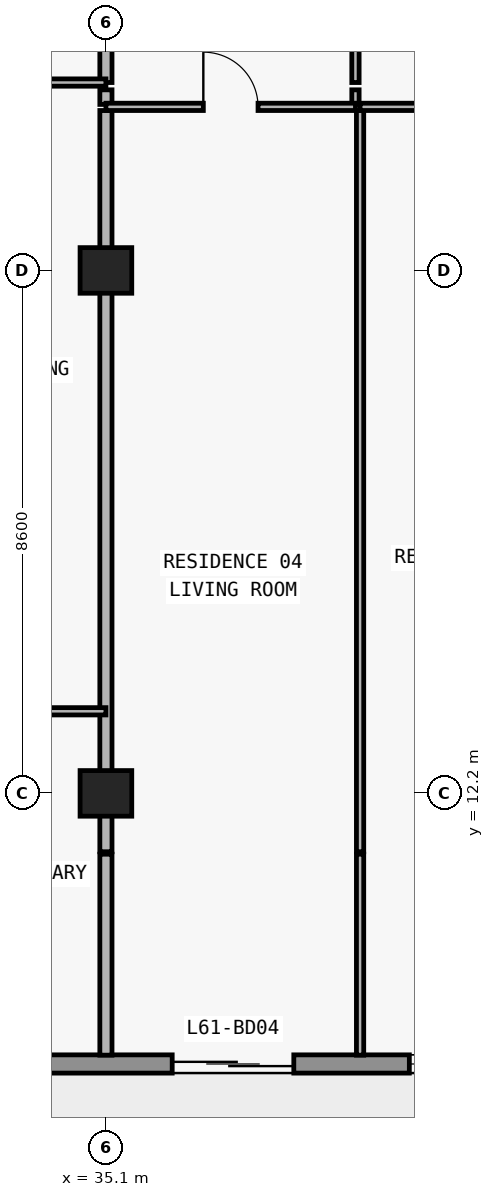
"""IFC4 building model, lengths in metres.
Left out: names, types, materials, properties, quantities, classifications, styles, units other than length and angle.
Written with IfcOpenShell. Run it as: python <this file> out.ifc"""

import sys

from ifc_helpers import new_model, si_unit, direction, frame, frame_2d, origin, origin_2d, place, context, subcontext, project, spatial, rectangle, extrude, element, fill, save


model = new_model("IFC4")
c1 = context("Model", 3, precision=1e-05, world=origin(), true_north=direction((0.0, 1.0)))
c2 = subcontext(c1, "Body", "Model", "MODEL_VIEW")
j1 = project(units=[si_unit("LENGTHUNIT", "METRE"), si_unit("PLANEANGLEUNIT", "RADIAN")], contexts=[c1])
p1 = place(None, origin())
s1 = spatial("IfcSite", under=j1, at=p1, CompositionType="ELEMENT")
p2 = place(p1, origin())
s2 = spatial("IfcBuilding", under=s1, at=p2, CompositionType="ELEMENT")
p3 = place(p2, frame((0.0, 0.0, 218.1)))
s3 = spatial("IfcBuildingStorey", under=s2, at=p3, CompositionType="ELEMENT", Elevation=218.1)
for number, where, z_axis, x_axis in (
    (1, (35.1, 12.2, 0.0), (0.0, 0.0, 1.0), (1.0, 0.0, 0.0)),
    (2, (35.1, 20.8, 0.0), (0.0, 0.0, 1.0), (1.0, 0.0, 0.0)),
):
    element("IfcColumn", number, at=place(p3, frame(where, z_axis=z_axis, x_axis=x_axis)), inside=s3, PredefinedType="COLUMN", context=c2, shape_type="SweptSolid", body=[
        extrude(rectangle(XDim=0.85, YDim=0.75, at=origin_2d()), origin(), (0.0, 0.0, 1.0), 3.0),
    ])
p4 = place(p3, frame((67.7, 7.75, 0.0), z_axis=(0.0, 0.0, 1.0), x_axis=(-1.0, 0.0, 0.0)))
e3 = element("IfcWall", 3, at=p4, inside=s3, PredefinedType="STANDARD", context=c2, shape_type="SweptSolid", body=[
    extrude(rectangle(XDim=57.6, YDim=0.3, at=frame_2d((28.8, 0.0))), origin(), (0.0, 0.0, 1.0), 3.0),
])
p5 = place(p4, frame((54.673, 0.0, 0.0)))
e4 = element("IfcOpeningElement", 4, at=p5, cuts=e3, PredefinedType="OPENING", context=c2, shape_type="SweptSolid", body=[
    extrude(rectangle(XDim=2.0, YDim=2.3, at=frame_2d((1.0, 1.15))), frame((0.0, 0.16, 0.0), z_axis=(0.0, -1.0, 0.0), x_axis=(1.0, 0.0, 0.0)), (0.0, 0.0, 1.0), 0.32),
])
p6 = place(p4, frame((50.473, 0.0, 0.85)))
e5 = element("IfcOpeningElement", 5, at=p6, cuts=e3, PredefinedType="OPENING", context=c2, shape_type="SweptSolid", body=[
    extrude(rectangle(XDim=2.2, YDim=1.55, at=frame_2d((1.1, 0.775))), frame((0.0, 0.16, 0.0), z_axis=(0.0, -1.0, 0.0), x_axis=(1.0, 0.0, 0.0)), (0.0, 0.0, 1.0), 0.32),
])
p7 = place(p4, frame((46.09, 0.0, 0.0)))
e6 = element("IfcOpeningElement", 6, at=p7, cuts=e3, PredefinedType="OPENING", context=c2, shape_type="SweptSolid", body=[
    extrude(rectangle(XDim=2.0, YDim=2.3, at=frame_2d((1.0, 1.15))), frame((0.0, 0.16, 0.0), z_axis=(0.0, -1.0, 0.0), x_axis=(1.0, 0.0, 0.0)), (0.0, 0.0, 1.0), 0.32),
])
p8 = place(p4, frame((41.99, 0.0, 0.85)))
e7 = element("IfcOpeningElement", 7, at=p8, cuts=e3, PredefinedType="OPENING", context=c2, shape_type="SweptSolid", body=[
    extrude(rectangle(XDim=1.8, YDim=1.55, at=frame_2d((0.9, 0.775))), frame((0.0, 0.16, 0.0), z_axis=(0.0, -1.0, 0.0), x_axis=(1.0, 0.0, 0.0)), (0.0, 0.0, 1.0), 0.32),
])
p9 = place(p4, frame((38.026, 0.0, 0.0)))
e8 = element("IfcOpeningElement", 8, at=p9, cuts=e3, PredefinedType="OPENING", context=c2, shape_type="SweptSolid", body=[
    extrude(rectangle(XDim=2.0, YDim=2.3, at=frame_2d((1.0, 1.15))), frame((0.0, 0.16, 0.0), z_axis=(0.0, -1.0, 0.0), x_axis=(1.0, 0.0, 0.0)), (0.0, 0.0, 1.0), 0.32),
])
p10 = place(p4, frame((33.726, 0.0, 0.85)))
e9 = element("IfcOpeningElement", 9, at=p10, cuts=e3, PredefinedType="OPENING", context=c2, shape_type="SweptSolid", body=[
    extrude(rectangle(XDim=2.2, YDim=1.55, at=frame_2d((1.1, 0.775))), frame((0.0, 0.16, 0.0), z_axis=(0.0, -1.0, 0.0), x_axis=(1.0, 0.0, 0.0)), (0.0, 0.0, 1.0), 0.32),
])
p11 = place(p4, frame((29.51, 0.0, 0.0)))
e10 = element("IfcOpeningElement", 10, at=p11, cuts=e3, PredefinedType="OPENING", context=c2, shape_type="SweptSolid", body=[
    extrude(rectangle(XDim=2.0, YDim=2.3, at=frame_2d((1.0, 1.15))), frame((0.0, 0.16, 0.0), z_axis=(0.0, -1.0, 0.0), x_axis=(1.0, 0.0, 0.0)), (0.0, 0.0, 1.0), 0.32),
])
p12 = place(p4, frame((25.81, 0.0, 0.85)))
e11 = element("IfcOpeningElement", 11, at=p12, cuts=e3, PredefinedType="OPENING", context=c2, shape_type="SweptSolid", body=[
    extrude(rectangle(XDim=1.8, YDim=1.55, at=frame_2d((0.9, 0.775))), frame((0.0, 0.16, 0.0), z_axis=(0.0, -1.0, 0.0), x_axis=(1.0, 0.0, 0.0)), (0.0, 0.0, 1.0), 0.32),
])
p13 = place(p4, frame((22.026, 0.0, 0.0)))
e12 = element("IfcOpeningElement", 12, at=p13, cuts=e3, PredefinedType="OPENING", context=c2, shape_type="SweptSolid", body=[
    extrude(rectangle(XDim=2.0, YDim=2.3, at=frame_2d((1.0, 1.15))), frame((0.0, 0.16, 0.0), z_axis=(0.0, -1.0, 0.0), x_axis=(1.0, 0.0, 0.0)), (0.0, 0.0, 1.0), 0.32),
])
p14 = place(p4, frame((17.726, 0.0, 0.85)))
e13 = element("IfcOpeningElement", 13, at=p14, cuts=e3, PredefinedType="OPENING", context=c2, shape_type="SweptSolid", body=[
    extrude(rectangle(XDim=2.2, YDim=1.55, at=frame_2d((1.1, 0.775))), frame((0.0, 0.16, 0.0), z_axis=(0.0, -1.0, 0.0), x_axis=(1.0, 0.0, 0.0)), (0.0, 0.0, 1.0), 0.32),
])
p15 = place(p4, frame((13.29, 0.0, 0.0)))
e14 = element("IfcOpeningElement", 14, at=p15, cuts=e3, PredefinedType="OPENING", context=c2, shape_type="SweptSolid", body=[
    extrude(rectangle(XDim=2.0, YDim=2.3, at=frame_2d((1.0, 1.15))), frame((0.0, 0.16, 0.0), z_axis=(0.0, -1.0, 0.0), x_axis=(1.0, 0.0, 0.0)), (0.0, 0.0, 1.0), 0.32),
])
p16 = place(p4, frame((9.19, 0.0, 0.85)))
e15 = element("IfcOpeningElement", 15, at=p16, cuts=e3, PredefinedType="OPENING", context=c2, shape_type="SweptSolid", body=[
    extrude(rectangle(XDim=1.8, YDim=1.55, at=frame_2d((0.9, 0.775))), frame((0.0, 0.16, 0.0), z_axis=(0.0, -1.0, 0.0), x_axis=(1.0, 0.0, 0.0)), (0.0, 0.0, 1.0), 0.32),
])
p17 = place(p4, frame((5.273, 0.0, 0.0)))
e16 = element("IfcOpeningElement", 16, at=p17, cuts=e3, PredefinedType="OPENING", context=c2, shape_type="SweptSolid", body=[
    extrude(rectangle(XDim=2.0, YDim=2.3, at=frame_2d((1.0, 1.15))), frame((0.0, 0.16, 0.0), z_axis=(0.0, -1.0, 0.0), x_axis=(1.0, 0.0, 0.0)), (0.0, 0.0, 1.0), 0.32),
])
p18 = place(p4, frame((1.073, 0.0, 0.85)))
e17 = element("IfcOpeningElement", 17, at=p18, cuts=e3, PredefinedType="OPENING", context=c2, shape_type="SweptSolid", body=[
    extrude(rectangle(XDim=2.2, YDim=1.55, at=frame_2d((1.1, 0.775))), frame((0.0, 0.16, 0.0), z_axis=(0.0, -1.0, 0.0), x_axis=(1.0, 0.0, 0.0)), (0.0, 0.0, 1.0), 0.32),
])
p19 = place(p3, frame((35.1, 7.895, 0.0), z_axis=(0.0, 0.0, 1.0), x_axis=(0.0, 1.0, 0.0)))
e18 = element("IfcWall", 18, at=p19, inside=s3, PredefinedType="PARTITIONING", context=c2, shape_type="SweptSolid", body=[
    extrude(rectangle(XDim=3.305, YDim=0.2, at=frame_2d((1.652, 0.0))), origin(), (0.0, 0.0, 1.0), 3.0),
])
p20 = place(p3, frame((35.1, 11.24, 0.0), z_axis=(0.0, 0.0, 1.0), x_axis=(0.0, 1.0, 0.0)))
e19 = element("IfcWall", 19, at=p20, inside=s3, PredefinedType="PARTITIONING", context=c2, shape_type="SweptSolid", body=[
    extrude(rectangle(XDim=12.19, YDim=0.2, at=frame_2d((6.095, 0.0))), origin(), (0.0, 0.0, 1.0), 2.213),
])
p21 = place(p3, frame((35.1, 23.53, 0.0), z_axis=(0.0, 0.0, 1.0), x_axis=(0.0, 1.0, 0.0)))
e20 = element("IfcWall", 20, at=p21, inside=s3, PredefinedType="PARTITIONING", context=c2, shape_type="SweptSolid", body=[
    extrude(rectangle(XDim=0.24, YDim=0.2, at=frame_2d((0.12, 0.0))), origin(), (0.0, 0.0, 1.0), 2.213),
])
p22 = place(p3, frame((35.1, 23.89, 0.0), z_axis=(0.0, 0.0, 1.0), x_axis=(0.0, 1.0, 0.0)))
e21 = element("IfcWall", 21, at=p22, inside=s3, PredefinedType="PARTITIONING", context=c2, shape_type="SweptSolid", body=[
    extrude(rectangle(XDim=4.69, YDim=0.2, at=frame_2d((2.345, 0.0))), origin(), (0.0, 0.0, 1.0), 2.213),
])
p23 = place(p3, frame((39.204, 23.53, 0.0), z_axis=(0.0, 0.0, 1.0), x_axis=(0.0, 1.0, 0.0)))
e22 = element("IfcWall", 22, at=p23, inside=s3, PredefinedType="PARTITIONING", context=c2, shape_type="SweptSolid", body=[
    extrude(rectangle(XDim=0.24, YDim=0.12, at=frame_2d((0.12, 0.0))), origin(), (0.0, 0.0, 1.0), 3.0),
])
p24 = place(p3, frame((39.204, 23.89, 0.0), z_axis=(0.0, 0.0, 1.0), x_axis=(0.0, 1.0, 0.0)))
e23 = element("IfcWall", 23, at=p24, inside=s3, PredefinedType="PARTITIONING", context=c2, shape_type="SweptSolid", body=[
    extrude(rectangle(XDim=4.69, YDim=0.12, at=frame_2d((2.345, 0.0))), origin(), (0.0, 0.0, 1.0), 3.0),
])
p25 = place(p24, frame((1.895, 0.0, 0.0)))
e24 = element("IfcOpeningElement", 24, at=p25, cuts=e23, PredefinedType="OPENING", context=c2, shape_type="SweptSolid", body=[
    extrude(rectangle(XDim=0.9, YDim=2.15, at=frame_2d((0.45, 1.075))), frame((0.0, 0.07, 0.0), z_axis=(0.0, -1.0, 0.0), x_axis=(1.0, 0.0, 0.0)), (0.0, 0.0, 1.0), 0.14),
])
p26 = place(p3, frame((39.28, 7.895, 0.0), z_axis=(0.0, 0.0, 1.0), x_axis=(0.0, 1.0, 0.0)))
e25 = element("IfcWall", 25, at=p26, inside=s3, PredefinedType="PARTITIONING", context=c2, shape_type="SweptSolid", body=[
    extrude(rectangle(XDim=3.305, YDim=0.12, at=frame_2d((1.652, 0.0))), origin(), (0.0, 0.0, 1.0), 3.0),
])
p27 = place(p3, frame((39.28, 11.24, 0.0), z_axis=(0.0, 0.0, 1.0), x_axis=(0.0, 1.0, 0.0)))
e26 = element("IfcWall", 26, at=p27, inside=s3, PredefinedType="PARTITIONING", context=c2, shape_type="SweptSolid", body=[
    extrude(rectangle(XDim=12.19, YDim=0.12, at=frame_2d((6.095, 0.0))), origin(), (0.0, 0.0, 1.0), 3.0),
])
p28 = place(p3, frame((30.648, 13.55, 0.0), z_axis=(0.0, 0.0, 1.0), x_axis=(1.0, 0.0, 0.0)))
e27 = element("IfcWall", 27, at=p28, inside=s3, PredefinedType="PARTITIONING", context=c2, shape_type="SweptSolid", body=[
    extrude(rectangle(XDim=4.452, YDim=0.12, at=frame_2d((2.226, 0.0))), origin(), (0.0, 0.0, 1.0), 3.0),
])
p29 = place(p28, frame((1.776, 0.0, 0.0)))
e28 = element("IfcOpeningElement", 28, at=p29, cuts=e27, PredefinedType="OPENING", context=c2, shape_type="SweptSolid", body=[
    extrude(rectangle(XDim=0.9, YDim=2.15, at=frame_2d((0.45, 1.075))), frame((0.0, 0.07, 0.0), z_axis=(0.0, -1.0, 0.0), x_axis=(1.0, 0.0, 0.0)), (0.0, 0.0, 1.0), 0.14),
])
p30 = place(p3, frame((35.1, 23.49, 0.0), z_axis=(0.0, 0.0, 1.0), x_axis=(1.0, 0.0, 0.0)))
e29 = element("IfcWall", 29, at=p30, inside=s3, PredefinedType="PARTITIONING", context=c2, shape_type="SweptSolid", body=[
    extrude(rectangle(XDim=4.104, YDim=0.12, at=frame_2d((2.052, 0.0))), origin(), (0.0, 0.0, 1.0), 3.0),
])
p31 = place(p30, frame((1.602, 0.0, 0.0)))
e30 = element("IfcOpeningElement", 30, at=p31, cuts=e29, PredefinedType="OPENING", context=c2, shape_type="SweptSolid", body=[
    extrude(rectangle(XDim=0.9, YDim=2.15, at=frame_2d((0.45, 1.075))), frame((0.0, 0.07, 0.0), z_axis=(0.0, -1.0, 0.0), x_axis=(1.0, 0.0, 0.0)), (0.0, 0.0, 1.0), 0.14),
])
p32 = place(p3, frame((39.28, 23.49, 0.0), z_axis=(0.0, 0.0, 1.0), x_axis=(1.0, 0.0, 0.0)))
e31 = element("IfcWall", 31, at=p32, inside=s3, PredefinedType="PARTITIONING", context=c2, shape_type="SweptSolid", body=[
    extrude(rectangle(XDim=3.42, YDim=0.12, at=frame_2d((1.71, 0.0))), origin(), (0.0, 0.0, 1.0), 3.0),
])
p33 = place(p32, frame((1.26, 0.0, 0.0)))
e32 = element("IfcOpeningElement", 32, at=p33, cuts=e31, PredefinedType="OPENING", context=c2, shape_type="SweptSolid", body=[
    extrude(rectangle(XDim=0.9, YDim=2.15, at=frame_2d((0.45, 1.075))), frame((0.0, 0.07, 0.0), z_axis=(0.0, -1.0, 0.0), x_axis=(1.0, 0.0, 0.0)), (0.0, 0.0, 1.0), 0.14),
])
p34 = place(p3, frame((26.92, 23.89, 0.0), z_axis=(0.0, 0.0, 1.0), x_axis=(1.0, 0.0, 0.0)))
e33 = element("IfcWall", 33, at=p34, inside=s3, PredefinedType="PARTITIONING", context=c2, shape_type="SweptSolid", body=[
    extrude(rectangle(XDim=8.18, YDim=0.12, at=frame_2d((4.09, 0.0))), origin(), (0.0, 0.0, 1.0), 3.0),
])
p35 = place(p34, frame((1.414, 0.0, 0.0)))
e34 = element("IfcOpeningElement", 34, at=p35, cuts=e33, PredefinedType="OPENING", context=c2, shape_type="SweptSolid", body=[
    extrude(rectangle(XDim=0.9, YDim=2.15, at=frame_2d((0.45, 1.075))), frame((0.0, 0.07, 0.0), z_axis=(0.0, -1.0, 0.0), x_axis=(1.0, 0.0, 0.0)), (0.0, 0.0, 1.0), 0.14),
])
p36 = place(p34, frame((5.673, 0.0, 0.0)))
e35 = element("IfcOpeningElement", 35, at=p36, cuts=e33, PredefinedType="OPENING", context=c2, shape_type="SweptSolid", body=[
    extrude(rectangle(XDim=0.9, YDim=2.15, at=frame_2d((0.45, 1.075))), frame((0.0, 0.07, 0.0), z_axis=(0.0, -1.0, 0.0), x_axis=(1.0, 0.0, 0.0)), (0.0, 0.0, 1.0), 0.14),
])
p37 = place(p11, origin())
e36 = element("IfcDoor", 36, at=p37, inside=s3, OperationType="DOUBLE_DOOR_SLIDING", PredefinedType="DOOR", context=c2, shape_type="SweptSolid", body=[
    extrude(rectangle(XDim=2.0, YDim=2.3, at=frame_2d((1.0, 1.15))), frame((0.0, 0.025, 0.0), z_axis=(0.0, -1.0, 0.0), x_axis=(1.0, 0.0, 0.0)), (0.0, 0.0, 1.0), 0.05),
])
fill(e10, e36)
p38 = place(p12, origin())
e37 = element("IfcWindow", 37, at=p38, inside=s3, PartitioningType="SINGLE_PANEL", PredefinedType="WINDOW", context=c2, shape_type="SweptSolid", body=[
    extrude(rectangle(XDim=1.8, YDim=1.55, at=frame_2d((0.9, 0.775))), frame((0.0, 0.03, 0.0), z_axis=(0.0, -1.0, 0.0), x_axis=(1.0, 0.0, 0.0)), (0.0, 0.0, 1.0), 0.06),
])
fill(e11, e37)
p39 = place(p31, origin())
e38 = element("IfcDoor", 38, at=p39, inside=s3, OperationType="SINGLE_SWING_LEFT", PredefinedType="DOOR", context=c2, shape_type="SweptSolid", body=[
    extrude(rectangle(XDim=0.9, YDim=2.15, at=frame_2d((0.45, 1.075))), frame((0.0, 0.025, 0.0), z_axis=(0.0, -1.0, 0.0), x_axis=(1.0, 0.0, 0.0)), (0.0, 0.0, 1.0), 0.05),
])
fill(e30, e38)
save(model, sys.argv[1])
